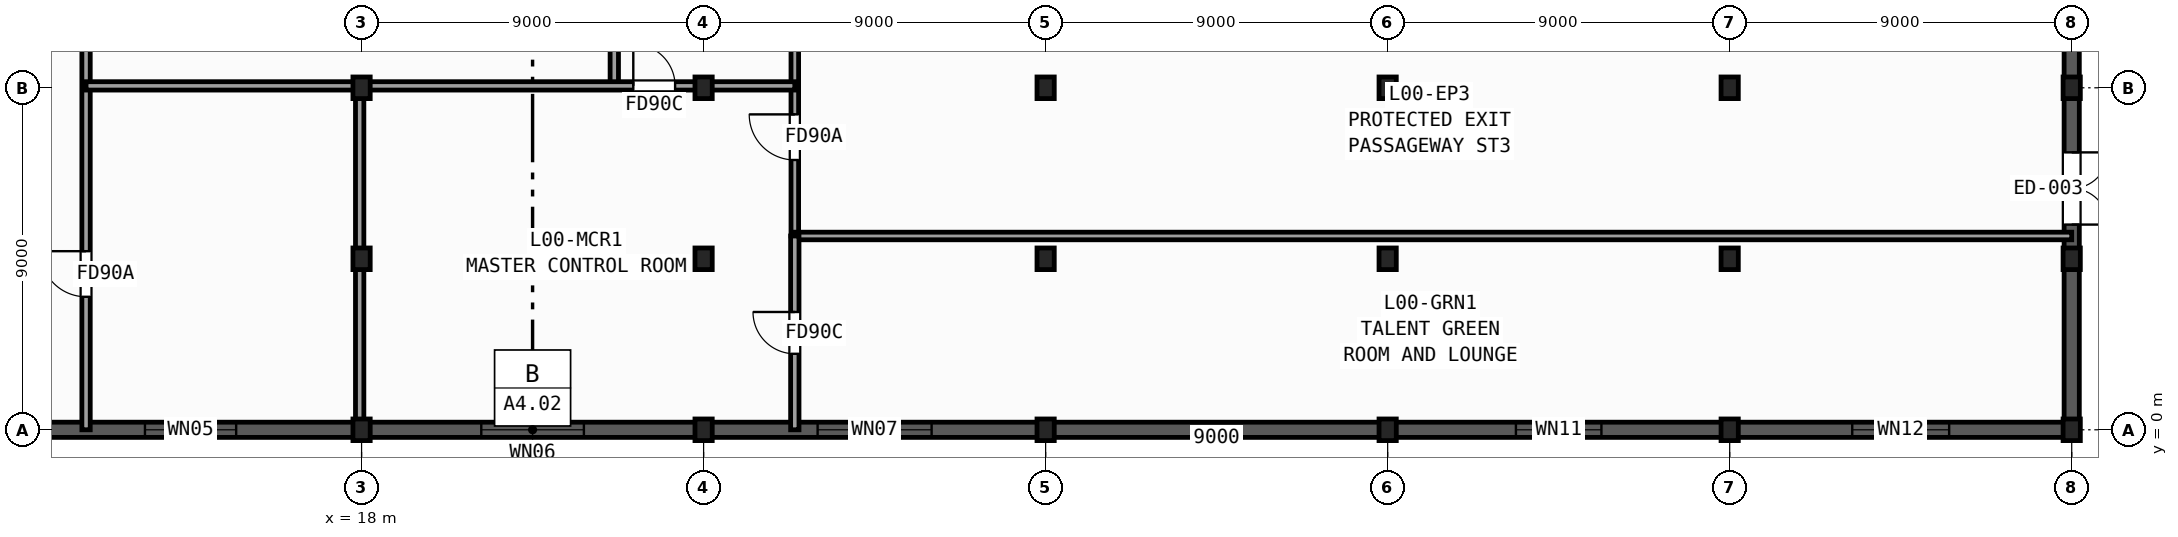
"""IFC4 building model, lengths in metres.
Left out: names, types, materials, properties, quantities, classifications, styles, units other than length and angle.
Written with IfcOpenShell. Run it as: python <this file> out.ifc"""

import sys

from ifc_helpers import new_model, si_unit, direction, frame, frame_2d, origin, origin_2d, place, context, subcontext, project, spatial, rectangle, i_section, extrude, element, fill, save


model = new_model("IFC4")
c1 = context("Model", 3, precision=1e-05, world=origin(), true_north=direction((0.0, 1.0)))
c2 = subcontext(c1, "Body", "Model", "MODEL_VIEW")
j1 = project(units=[si_unit("LENGTHUNIT", "METRE"), si_unit("PLANEANGLEUNIT", "RADIAN")], contexts=[c1])
p1 = place(None, origin())
s1 = spatial("IfcSite", under=j1, at=p1, CompositionType="ELEMENT")
p2 = place(p1, origin())
s2 = spatial("IfcBuilding", under=s1, at=p2, CompositionType="ELEMENT")
p3 = place(p2, origin())
s3 = spatial("IfcBuildingStorey", under=s2, at=p3, CompositionType="ELEMENT", Elevation=0.0)
for number, where, z_axis, x_axis in (
    (1, (18.0, 0.0, 0.0), (0.0, 0.0, 1.0), (1.0, 0.0, 0.0)),
    (2, (18.0, 9.0, 0.0), (0.0, 0.0, 1.0), (1.0, 0.0, 0.0)),
    (3, (27.0, 0.0, 0.0), (0.0, 0.0, 1.0), (1.0, 0.0, 0.0)),
    (4, (27.0, 9.0, 0.0), (0.0, 0.0, 1.0), (1.0, 0.0, 0.0)),
    (5, (36.0, 0.0, 0.0), (0.0, 0.0, 1.0), (1.0, 0.0, 0.0)),
    (6, (36.0, 9.0, 0.0), (0.0, 0.0, 1.0), (1.0, 0.0, 0.0)),
    (7, (45.0, 0.0, 0.0), (0.0, 0.0, 1.0), (1.0, 0.0, 0.0)),
    (8, (45.0, 9.0, 0.0), (0.0, 0.0, 1.0), (1.0, 0.0, 0.0)),
    (9, (54.0, 0.0, 0.0), (0.0, 0.0, 1.0), (1.0, 0.0, 0.0)),
    (10, (54.0, 9.0, 0.0), (0.0, 0.0, 1.0), (1.0, 0.0, 0.0)),
    (11, (63.0, 0.0, 0.0), (0.0, 0.0, 1.0), (1.0, 0.0, 0.0)),
    (12, (63.0, 9.0, 0.0), (0.0, 0.0, 1.0), (1.0, 0.0, 0.0)),
    (13, (18.0, 4.5, 0.0), (0.0, 0.0, 1.0), (1.0, 0.0, 0.0)),
    (14, (27.0, 4.5, 0.0), (0.0, 0.0, 1.0), (1.0, 0.0, 0.0)),
    (15, (36.0, 4.5, 0.0), (0.0, 0.0, 1.0), (1.0, 0.0, 0.0)),
    (16, (45.0, 4.5, 0.0), (0.0, 0.0, 1.0), (1.0, 0.0, 0.0)),
    (17, (54.0, 4.5, 0.0), (0.0, 0.0, 1.0), (1.0, 0.0, 0.0)),
    (18, (63.0, 4.5, 0.0), (0.0, 0.0, 1.0), (1.0, 0.0, 0.0)),
):
    element("IfcColumn", number, at=place(p3, frame(where, z_axis=z_axis, x_axis=x_axis)), inside=s3, PredefinedType="COLUMN", context=c2, shape_type="SweptSolid", body=[
        extrude(i_section(OverallWidth=0.454, OverallDepth=0.569, WebThickness=0.078, FlangeThickness=0.125, FilletRadius=0.015, at=origin_2d()), origin(), (0.0, 0.0, 1.0), 5.8),
    ])
p4 = place(p3, frame((63.0, 54.2, 0.0), z_axis=(0.0, 0.0, 1.0), x_axis=(0.0, -1.0, 0.0)))
e19 = element("IfcWall", 19, at=p4, inside=s3, PredefinedType="SOLIDWALL", context=c2, shape_type="SweptSolid", body=[
    extrude(rectangle(XDim=54.4, YDim=0.4, at=frame_2d((27.2, 0.0))), origin(), (0.0, 0.0, 1.0), 5.48),
])
p5 = place(p4, frame((46.9, 0.0, 0.0)))
e20 = element("IfcOpeningElement", 20, at=p5, cuts=e19, PredefinedType="OPENING", context=c2, shape_type="SweptSolid", body=[
    extrude(rectangle(XDim=1.9, YDim=2.2, at=frame_2d((0.95, 1.1))), frame((0.0, 0.21, 0.0), z_axis=(0.0, -1.0, 0.0), x_axis=(1.0, 0.0, 0.0)), (0.0, 0.0, 1.0), 0.42),
])
p6 = place(p4, frame((12.4, 0.0, 0.0)))
e21 = element("IfcOpeningElement", 21, at=p6, cuts=e19, PredefinedType="OPENING", context=c2, shape_type="SweptSolid", body=[
    extrude(rectangle(XDim=1.6, YDim=2.2, at=frame_2d((0.8, 1.1))), frame((0.0, 0.21, 0.0), z_axis=(0.0, -1.0, 0.0), x_axis=(1.0, 0.0, 0.0)), (0.0, 0.0, 1.0), 0.42),
])
p7 = place(p4, frame((21.4, 0.0, 0.0)))
e22 = element("IfcOpeningElement", 22, at=p7, cuts=e19, PredefinedType="OPENING", context=c2, shape_type="SweptSolid", body=[
    extrude(rectangle(XDim=1.6, YDim=2.2, at=frame_2d((0.8, 1.1))), frame((0.0, 0.21, 0.0), z_axis=(0.0, -1.0, 0.0), x_axis=(1.0, 0.0, 0.0)), (0.0, 0.0, 1.0), 0.42),
])
p8 = place(p4, frame((29.6, 0.0, 0.0)))
e23 = element("IfcOpeningElement", 23, at=p8, cuts=e19, PredefinedType="OPENING", context=c2, shape_type="SweptSolid", body=[
    extrude(rectangle(XDim=4.2, YDim=3.8, at=frame_2d((2.1, 1.9))), frame((0.0, 0.21, 0.0), z_axis=(0.0, -1.0, 0.0), x_axis=(1.0, 0.0, 0.0)), (0.0, 0.0, 1.0), 0.42),
])
p9 = place(p3, frame((62.8, 0.0, 0.0), z_axis=(0.0, 0.0, 1.0), x_axis=(-1.0, 0.0, 0.0)))
e24 = element("IfcWall", 24, at=p9, inside=s3, PredefinedType="SOLIDWALL", context=c2, shape_type="SweptSolid", body=[
    extrude(rectangle(XDim=62.6, YDim=0.4, at=frame_2d((31.3, 0.0))), origin(), (0.0, 0.0, 1.0), 5.48),
])
p10 = place(p9, frame((57.7, 0.0, 1.1)))
e25 = element("IfcOpeningElement", 25, at=p10, cuts=e24, PredefinedType="OPENING", context=c2, shape_type="SweptSolid", body=[
    extrude(rectangle(XDim=1.2, YDim=1.5, at=frame_2d((0.6, 0.75))), frame((0.0, 0.21, 0.0), z_axis=(0.0, -1.0, 0.0), x_axis=(1.0, 0.0, 0.0)), (0.0, 0.0, 1.0), 0.42),
])
p11 = place(p9, frame((48.1, 0.0, 1.1)))
e26 = element("IfcOpeningElement", 26, at=p11, cuts=e24, PredefinedType="OPENING", context=c2, shape_type="SweptSolid", body=[
    extrude(rectangle(XDim=2.4, YDim=1.95, at=frame_2d((1.2, 0.975))), frame((0.0, 0.21, 0.0), z_axis=(0.0, -1.0, 0.0), x_axis=(1.0, 0.0, 0.0)), (0.0, 0.0, 1.0), 0.42),
])
p12 = place(p9, frame((38.95, 0.0, 1.1)))
e27 = element("IfcOpeningElement", 27, at=p12, cuts=e24, PredefinedType="OPENING", context=c2, shape_type="SweptSolid", body=[
    extrude(rectangle(XDim=2.7, YDim=2.1, at=frame_2d((1.35, 1.05))), frame((0.0, 0.21, 0.0), z_axis=(0.0, -1.0, 0.0), x_axis=(1.0, 0.0, 0.0)), (0.0, 0.0, 1.0), 0.42),
])
p13 = place(p9, frame((29.8, 0.0, 1.1)))
e28 = element("IfcOpeningElement", 28, at=p13, cuts=e24, PredefinedType="OPENING", context=c2, shape_type="SweptSolid", body=[
    extrude(rectangle(XDim=3.0, YDim=2.25, at=frame_2d((1.5, 1.125))), frame((0.0, 0.21, 0.0), z_axis=(0.0, -1.0, 0.0), x_axis=(1.0, 0.0, 0.0)), (0.0, 0.0, 1.0), 0.42),
])
p14 = place(p9, frame((12.175, 0.0, 1.1)))
e29 = element("IfcOpeningElement", 29, at=p14, cuts=e24, PredefinedType="OPENING", context=c2, shape_type="SweptSolid", body=[
    extrude(rectangle(XDim=2.25, YDim=2.1, at=frame_2d((1.125, 1.05))), frame((0.0, 0.21, 0.0), z_axis=(0.0, -1.0, 0.0), x_axis=(1.0, 0.0, 0.0)), (0.0, 0.0, 1.0), 0.42),
])
p15 = place(p9, frame((3.025, 0.0, 1.1)))
e30 = element("IfcOpeningElement", 30, at=p15, cuts=e24, PredefinedType="OPENING", context=c2, shape_type="SweptSolid", body=[
    extrude(rectangle(XDim=2.55, YDim=2.25, at=frame_2d((1.275, 1.125))), frame((0.0, 0.21, 0.0), z_axis=(0.0, -1.0, 0.0), x_axis=(1.0, 0.0, 0.0)), (0.0, 0.0, 1.0), 0.42),
])
p16 = place(p3, frame((29.4, 5.1, 0.0), z_axis=(0.0, 0.0, 1.0), x_axis=(0.0, 1.0, 0.0)))
e31 = element("IfcWall", 31, at=p16, inside=s3, PredefinedType="PARTITIONING", context=c2, shape_type="SweptSolid", body=[
    extrude(rectangle(XDim=6.1, YDim=0.2, at=frame_2d((3.05, 0.0))), origin(), (0.0, 0.0, 1.0), 4.533),
])
p17 = place(p16, frame((2.0, 0.0, 0.0)))
e32 = element("IfcOpeningElement", 32, at=p17, cuts=e31, PredefinedType="OPENING", context=c2, shape_type="SweptSolid", body=[
    extrude(rectangle(XDim=1.2, YDim=2.15, at=frame_2d((0.6, 1.075))), frame((0.0, 0.11, 0.0), z_axis=(0.0, -1.0, 0.0), x_axis=(1.0, 0.0, 0.0)), (0.0, 0.0, 1.0), 0.22),
])
p18 = place(p3, frame((29.4, 5.1, 0.0), z_axis=(0.0, 0.0, 1.0), x_axis=(1.0, 0.0, 0.0)))
e33 = element("IfcWall", 33, at=p18, inside=s3, PredefinedType="PARTITIONING", context=c2, shape_type="SweptSolid", body=[
    extrude(rectangle(XDim=33.6, YDim=0.2, at=frame_2d((16.8, 0.0))), origin(), (0.0, 0.0, 1.0), 4.605),
])
p19 = place(p3, frame((10.75, 0.0, 0.0), z_axis=(0.0, 0.0, 1.0), x_axis=(0.0, 1.0, 0.0)))
e34 = element("IfcWall", 34, at=p19, inside=s3, PredefinedType="PARTITIONING", context=c2, shape_type="SweptSolid", body=[
    extrude(rectangle(XDim=25.0, YDim=0.22, at=frame_2d((12.5, 0.0))), origin(), (0.0, 0.0, 1.0), 4.512),
])
p20 = place(p19, frame((12.0, 0.0, 0.0)))
e35 = element("IfcOpeningElement", 35, at=p20, cuts=e34, PredefinedType="OPENING", context=c2, shape_type="SweptSolid", body=[
    extrude(rectangle(XDim=1.6, YDim=2.2, at=frame_2d((0.8, 1.1))), frame((0.0, 0.12, 0.0), z_axis=(0.0, -1.0, 0.0), x_axis=(1.0, 0.0, 0.0)), (0.0, 0.0, 1.0), 0.24),
])
p21 = place(p19, frame((3.5, 0.0, 0.0)))
e36 = element("IfcOpeningElement", 36, at=p21, cuts=e34, PredefinedType="OPENING", context=c2, shape_type="SweptSolid", body=[
    extrude(rectangle(XDim=1.2, YDim=2.15, at=frame_2d((0.6, 1.075))), frame((0.0, 0.12, 0.0), z_axis=(0.0, -1.0, 0.0), x_axis=(1.0, 0.0, 0.0)), (0.0, 0.0, 1.0), 0.24),
])
p22 = place(p3, frame((24.65, 9.05, 0.0), z_axis=(0.0, 0.0, 1.0), x_axis=(0.0, 1.0, 0.0)))
e37 = element("IfcWall", 37, at=p22, inside=s3, PredefinedType="PARTITIONING", context=c2, shape_type="SweptSolid", body=[
    extrude(rectangle(XDim=19.15, YDim=0.22, at=frame_2d((9.575, 0.0))), origin(), (0.0, 0.0, 1.0), 4.512),
])
p23 = place(p3, frame((10.75, 9.05, 0.0), z_axis=(0.0, 0.0, 1.0), x_axis=(1.0, 0.0, 0.0)))
e38 = element("IfcWall", 38, at=p23, inside=s3, PredefinedType="PARTITIONING", context=c2, shape_type="SweptSolid", body=[
    extrude(rectangle(XDim=18.65, YDim=0.22, at=frame_2d((9.325, 0.0))), origin(), (0.0, 0.0, 1.0), 4.533),
])
p24 = place(p23, frame((14.4, 0.0, 0.0)))
e39 = element("IfcOpeningElement", 39, at=p24, cuts=e38, PredefinedType="OPENING", context=c2, shape_type="SweptSolid", body=[
    extrude(rectangle(XDim=1.1, YDim=2.15, at=frame_2d((0.55, 1.075))), frame((0.0, 0.12, 0.0), z_axis=(0.0, -1.0, 0.0), x_axis=(1.0, 0.0, 0.0)), (0.0, 0.0, 1.0), 0.24),
])
p25 = place(p3, frame((17.95, 0.0, 0.0), z_axis=(0.0, 0.0, 1.0), x_axis=(0.0, 1.0, 0.0)))
e40 = element("IfcWall", 40, at=p25, inside=s3, PredefinedType="PARTITIONING", context=c2, shape_type="SweptSolid", body=[
    extrude(rectangle(XDim=9.05, YDim=0.22, at=frame_2d((4.525, 0.0))), origin(), (0.0, 0.0, 1.0), 4.533),
])
p26 = place(p3, frame((29.4, 0.0, 0.0), z_axis=(0.0, 0.0, 1.0), x_axis=(0.0, 1.0, 0.0)))
e41 = element("IfcWall", 41, at=p26, inside=s3, PredefinedType="PARTITIONING", context=c2, shape_type="SweptSolid", body=[
    extrude(rectangle(XDim=5.1, YDim=0.22, at=frame_2d((2.55, 0.0))), origin(), (0.0, 0.0, 1.0), 4.533),
])
p27 = place(p26, frame((2.0, 0.0, 0.0)))
e42 = element("IfcOpeningElement", 42, at=p27, cuts=e41, PredefinedType="OPENING", context=c2, shape_type="SweptSolid", body=[
    extrude(rectangle(XDim=1.1, YDim=2.15, at=frame_2d((0.55, 1.075))), frame((0.0, 0.12, 0.0), z_axis=(0.0, -1.0, 0.0), x_axis=(1.0, 0.0, 0.0)), (0.0, 0.0, 1.0), 0.24),
])
p28 = place(p5, origin())
e43 = element("IfcDoor", 43, at=p28, inside=s3, OperationType="DOUBLE_DOOR_SINGLE_SWING", PredefinedType="DOOR", context=c2, shape_type="SweptSolid", body=[
    extrude(rectangle(XDim=1.9, YDim=2.2, at=frame_2d((0.95, 1.1))), frame((0.0, 0.025, 0.0), z_axis=(0.0, -1.0, 0.0), x_axis=(1.0, 0.0, 0.0)), (0.0, 0.0, 1.0), 0.05),
])
fill(e20, e43)
p29 = place(p11, origin())
e44 = element("IfcWindow", 44, at=p29, inside=s3, PartitioningType="SINGLE_PANEL", PredefinedType="WINDOW", context=c2, shape_type="SweptSolid", body=[
    extrude(rectangle(XDim=2.4, YDim=1.95, at=frame_2d((1.2, 0.975))), frame((0.0, 0.03, 0.0), z_axis=(0.0, -1.0, 0.0), x_axis=(1.0, 0.0, 0.0)), (0.0, 0.0, 1.0), 0.06),
])
fill(e26, e44)
p30 = place(p12, origin())
e45 = element("IfcWindow", 45, at=p30, inside=s3, PartitioningType="SINGLE_PANEL", PredefinedType="WINDOW", context=c2, shape_type="SweptSolid", body=[
    extrude(rectangle(XDim=2.7, YDim=2.1, at=frame_2d((1.35, 1.05))), frame((0.0, 0.03, 0.0), z_axis=(0.0, -1.0, 0.0), x_axis=(1.0, 0.0, 0.0)), (0.0, 0.0, 1.0), 0.06),
])
fill(e27, e45)
p31 = place(p13, origin())
e46 = element("IfcWindow", 46, at=p31, inside=s3, PartitioningType="SINGLE_PANEL", PredefinedType="WINDOW", context=c2, shape_type="SweptSolid", body=[
    extrude(rectangle(XDim=3.0, YDim=2.25, at=frame_2d((1.5, 1.125))), frame((0.0, 0.03, 0.0), z_axis=(0.0, -1.0, 0.0), x_axis=(1.0, 0.0, 0.0)), (0.0, 0.0, 1.0), 0.06),
])
fill(e28, e46)
p32 = place(p14, origin())
e47 = element("IfcWindow", 47, at=p32, inside=s3, PartitioningType="SINGLE_PANEL", PredefinedType="WINDOW", context=c2, shape_type="SweptSolid", body=[
    extrude(rectangle(XDim=2.25, YDim=2.1, at=frame_2d((1.125, 1.05))), frame((0.0, 0.03, 0.0), z_axis=(0.0, -1.0, 0.0), x_axis=(1.0, 0.0, 0.0)), (0.0, 0.0, 1.0), 0.06),
])
fill(e29, e47)
p33 = place(p15, origin())
e48 = element("IfcWindow", 48, at=p33, inside=s3, PartitioningType="SINGLE_PANEL", PredefinedType="WINDOW", context=c2, shape_type="SweptSolid", body=[
    extrude(rectangle(XDim=2.55, YDim=2.25, at=frame_2d((1.275, 1.125))), frame((0.0, 0.03, 0.0), z_axis=(0.0, -1.0, 0.0), x_axis=(1.0, 0.0, 0.0)), (0.0, 0.0, 1.0), 0.06),
])
fill(e30, e48)
p34 = place(p17, origin())
e49 = element("IfcDoor", 49, at=p34, inside=s3, OperationType="SINGLE_SWING_RIGHT", PredefinedType="DOOR", context=c2, shape_type="SweptSolid", body=[
    extrude(rectangle(XDim=1.2, YDim=2.15, at=frame_2d((0.6, 1.075))), frame((0.0, 0.025, 0.0), z_axis=(0.0, -1.0, 0.0), x_axis=(1.0, 0.0, 0.0)), (0.0, 0.0, 1.0), 0.05),
])
fill(e32, e49)
p35 = place(p21, origin())
e50 = element("IfcDoor", 50, at=p35, inside=s3, OperationType="SINGLE_SWING_RIGHT", PredefinedType="DOOR", context=c2, shape_type="SweptSolid", body=[
    extrude(rectangle(XDim=1.2, YDim=2.15, at=frame_2d((0.6, 1.075))), frame((0.0, 0.025, 0.0), z_axis=(0.0, -1.0, 0.0), x_axis=(1.0, 0.0, 0.0)), (0.0, 0.0, 1.0), 0.05),
])
fill(e36, e50)
p36 = place(p24, origin())
e51 = element("IfcDoor", 51, at=p36, inside=s3, OperationType="SINGLE_SWING_LEFT", PredefinedType="DOOR", context=c2, shape_type="SweptSolid", body=[
    extrude(rectangle(XDim=1.1, YDim=2.15, at=frame_2d((0.55, 1.075))), frame((0.0, 0.025, 0.0), z_axis=(0.0, -1.0, 0.0), x_axis=(1.0, 0.0, 0.0)), (0.0, 0.0, 1.0), 0.05),
])
fill(e39, e51)
p37 = place(p27, origin())
e52 = element("IfcDoor", 52, at=p37, inside=s3, OperationType="SINGLE_SWING_RIGHT", PredefinedType="DOOR", context=c2, shape_type="SweptSolid", body=[
    extrude(rectangle(XDim=1.1, YDim=2.15, at=frame_2d((0.55, 1.075))), frame((0.0, 0.025, 0.0), z_axis=(0.0, -1.0, 0.0), x_axis=(1.0, 0.0, 0.0)), (0.0, 0.0, 1.0), 0.05),
])
fill(e42, e52)
save(model, sys.argv[1])
